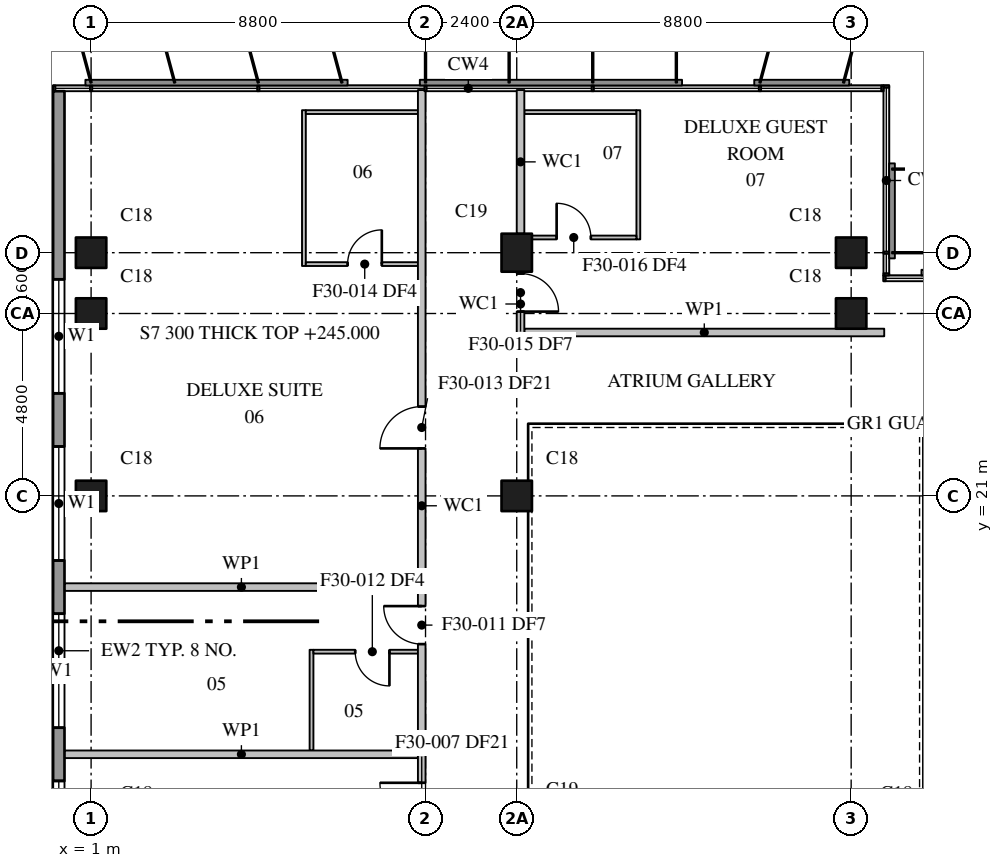
"""IFC4 building model, lengths in metres.
Left out: names, types, materials, properties, quantities, classifications, styles, units other than length and angle.
Written with IfcOpenShell. Run it as: python <this file> out.ifc"""

import sys

from ifc_helpers import new_model, si_unit, direction, frame, frame_2d, origin, origin_2d, place, context, subcontext, project, spatial, rectangle, extrude, element, fill, save


model = new_model("IFC4")
c1 = context("Model", 3, precision=1e-05, world=origin(), true_north=direction((0.0, 1.0)))
c2 = subcontext(c1, "Body", "Model", "MODEL_VIEW")
j1 = project(units=[si_unit("LENGTHUNIT", "METRE"), si_unit("PLANEANGLEUNIT", "RADIAN")], contexts=[c1])
p1 = place(None, origin())
s1 = spatial("IfcSite", under=j1, at=p1, CompositionType="ELEMENT")
p2 = place(p1, origin())
s2 = spatial("IfcBuilding", under=s1, at=p2, CompositionType="ELEMENT")
p3 = place(p2, frame((0.0, 0.0, 245.0)))
s3 = spatial("IfcBuildingStorey", under=s2, at=p3, CompositionType="ELEMENT", Elevation=245.0)
for number, where, z_axis, x_axis in (
    (1, (1.0, 21.0, 0.0), (0.0, 0.0, 1.0), (1.0, 0.0, 0.0)),
    (2, (1.0, 25.8, 0.0), (0.0, 0.0, 1.0), (1.0, 0.0, 0.0)),
    (3, (1.0, 27.4, 0.0), (0.0, 0.0, 1.0), (1.0, 0.0, 0.0)),
    (4, (12.2, 21.0, 0.0), (0.0, 0.0, 1.0), (1.0, 0.0, 0.0)),
):
    element("IfcColumn", number, at=place(p3, frame(where, z_axis=z_axis, x_axis=x_axis)), inside=s3, PredefinedType="COLUMN", context=c2, shape_type="SweptSolid", body=[
        extrude(rectangle(XDim=0.8, YDim=0.8, at=origin_2d()), origin(), (0.0, 0.0, 1.0), 3.7),
    ])
p4 = place(p3, frame((12.2, 27.4, 0.0), z_axis=(0.0, 0.0, 1.0), x_axis=(0.0, 1.0, 0.0)))
e5 = element("IfcColumn", 5, at=p4, inside=s3, PredefinedType="COLUMN", context=c2, shape_type="SweptSolid", body=[
    extrude(rectangle(XDim=1.0, YDim=0.8, at=origin_2d()), origin(), (0.0, 0.0, 1.0), 3.7),
])
for number, where, z_axis, x_axis in (
    (6, (21.0, 25.8, 0.0), (0.0, 0.0, 1.0), (1.0, 0.0, 0.0)),
    (7, (21.0, 27.4, 0.0), (0.0, 0.0, 1.0), (1.0, 0.0, 0.0)),
):
    element("IfcColumn", number, at=place(p3, frame(where, z_axis=z_axis, x_axis=x_axis)), inside=s3, PredefinedType="COLUMN", context=c2, shape_type="SweptSolid", body=[
        extrude(rectangle(XDim=0.8, YDim=0.8, at=origin_2d()), origin(), (0.0, 0.0, 1.0), 3.7),
    ])
p5 = place(p3, frame((0.15, 31.65, 0.0), z_axis=(0.0, 0.0, 1.0), x_axis=(0.0, -1.0, 0.0)))
e8 = element("IfcWall", 8, at=p5, inside=s3, PredefinedType="STANDARD", context=c2, shape_type="SweptSolid", body=[
    extrude(rectangle(XDim=29.45, YDim=0.3, at=frame_2d((14.725, 0.0))), origin(), (0.0, 0.0, 1.0), 3.4),
])
p6 = place(p5, frame((4.95, 0.0, 0.75)))
e9 = element("IfcOpeningElement", 9, at=p6, cuts=e8, PredefinedType="OPENING", context=c2, shape_type="SweptSolid", body=[
    extrude(rectangle(XDim=3.0, YDim=2.3, at=frame_2d((1.5, 1.15))), frame((0.0, 0.16, 0.0), z_axis=(0.0, -1.0, 0.0), x_axis=(1.0, 0.0, 0.0)), (0.0, 0.0, 1.0), 0.32),
])
p7 = place(p5, frame((9.35, 0.0, 0.75)))
e10 = element("IfcOpeningElement", 10, at=p7, cuts=e8, PredefinedType="OPENING", context=c2, shape_type="SweptSolid", body=[
    extrude(rectangle(XDim=3.0, YDim=2.3, at=frame_2d((1.5, 1.15))), frame((0.0, 0.16, 0.0), z_axis=(0.0, -1.0, 0.0), x_axis=(1.0, 0.0, 0.0)), (0.0, 0.0, 1.0), 0.32),
])
p8 = place(p5, frame((13.75, 0.0, 0.75)))
e11 = element("IfcOpeningElement", 11, at=p8, cuts=e8, PredefinedType="OPENING", context=c2, shape_type="SweptSolid", body=[
    extrude(rectangle(XDim=3.0, YDim=2.3, at=frame_2d((1.5, 1.15))), frame((0.0, 0.16, 0.0), z_axis=(0.0, -1.0, 0.0), x_axis=(1.0, 0.0, 0.0)), (0.0, 0.0, 1.0), 0.32),
])
p9 = place(p5, frame((18.15, 0.0, 0.75)))
e12 = element("IfcOpeningElement", 12, at=p9, cuts=e8, PredefinedType="OPENING", context=c2, shape_type="SweptSolid", body=[
    extrude(rectangle(XDim=3.0, YDim=2.3, at=frame_2d((1.5, 1.15))), frame((0.0, 0.16, 0.0), z_axis=(0.0, -1.0, 0.0), x_axis=(1.0, 0.0, 0.0)), (0.0, 0.0, 1.0), 0.32),
])
p10 = place(p5, frame((22.55, 0.0, 0.75)))
e13 = element("IfcOpeningElement", 13, at=p10, cuts=e8, PredefinedType="OPENING", context=c2, shape_type="SweptSolid", body=[
    extrude(rectangle(XDim=3.0, YDim=2.3, at=frame_2d((1.5, 1.15))), frame((0.0, 0.16, 0.0), z_axis=(0.0, -1.0, 0.0), x_axis=(1.0, 0.0, 0.0)), (0.0, 0.0, 1.0), 0.32),
])
p11 = place(p3, frame((9.7, 9.8, 0.0), z_axis=(0.0, 0.0, 1.0), x_axis=(0.0, 1.0, 0.0)))
e14 = element("IfcWall", 14, at=p11, inside=s3, PredefinedType="PARTITIONING", context=c2, shape_type="SweptSolid", body=[
    extrude(rectangle(XDim=21.88, YDim=0.2, at=frame_2d((10.94, 0.0))), origin(), (0.0, 0.0, 1.0), 3.4),
])
p12 = place(p11, frame((2.55, 0.0, 0.0)))
e15 = element("IfcOpeningElement", 15, at=p12, cuts=e14, PredefinedType="OPENING", context=c2, shape_type="SweptSolid", body=[
    extrude(rectangle(XDim=1.1, YDim=2.1, at=frame_2d((0.55, 1.05))), frame((0.0, 0.11, 0.0), z_axis=(0.0, -1.0, 0.0), x_axis=(1.0, 0.0, 0.0)), (0.0, 0.0, 1.0), 0.22),
])
p13 = place(p11, frame((7.3, 0.0, 0.0)))
e16 = element("IfcOpeningElement", 16, at=p13, cuts=e14, PredefinedType="OPENING", context=c2, shape_type="SweptSolid", body=[
    extrude(rectangle(XDim=1.0, YDim=2.1, at=frame_2d((0.5, 1.05))), frame((0.0, 0.11, 0.0), z_axis=(0.0, -1.0, 0.0), x_axis=(1.0, 0.0, 0.0)), (0.0, 0.0, 1.0), 0.22),
])
p14 = place(p11, frame((12.45, 0.0, 0.0)))
e17 = element("IfcOpeningElement", 17, at=p14, cuts=e14, PredefinedType="OPENING", context=c2, shape_type="SweptSolid", body=[
    extrude(rectangle(XDim=1.1, YDim=2.1, at=frame_2d((0.55, 1.05))), frame((0.0, 0.11, 0.0), z_axis=(0.0, -1.0, 0.0), x_axis=(1.0, 0.0, 0.0)), (0.0, 0.0, 1.0), 0.22),
])
for number, where, z_axis, x_axis in (
    (18, (0.31, 14.2, 0.0), (0.0, 0.0, 1.0), (1.0, 0.0, 0.0)),
    (19, (0.31, 18.6, 0.0), (0.0, 0.0, 1.0), (1.0, 0.0, 0.0)),
):
    element("IfcWall", number, at=place(p3, frame(where, z_axis=z_axis, x_axis=x_axis)), inside=s3, PredefinedType="PARTITIONING", context=c2, shape_type="SweptSolid", body=[
        extrude(rectangle(XDim=9.29, YDim=0.2, at=frame_2d((4.645, 0.0))), origin(), (0.0, 0.0, 1.0), 3.4),
    ])
p15 = place(p3, frame((12.3, 26.9, 0.0), z_axis=(0.0, 0.0, 1.0), x_axis=(0.0, -1.0, 0.0)))
e20 = element("IfcWall", 20, at=p15, inside=s3, PredefinedType="PARTITIONING", context=c2, shape_type="SweptSolid", body=[
    extrude(rectangle(XDim=1.7, YDim=0.2, at=frame_2d((0.85, 0.0))), origin(), (0.0, 0.0, 1.0), 3.4),
])
p16 = place(p15, frame((0.05, 0.0, 0.0)))
e21 = element("IfcOpeningElement", 21, at=p16, cuts=e20, PredefinedType="OPENING", context=c2, shape_type="SweptSolid", body=[
    extrude(rectangle(XDim=1.0, YDim=2.1, at=frame_2d((0.5, 1.05))), frame((0.0, 0.11, 0.0), z_axis=(0.0, -1.0, 0.0), x_axis=(1.0, 0.0, 0.0)), (0.0, 0.0, 1.0), 0.22),
])
p17 = place(p3, frame((12.3, 27.9, 0.0), z_axis=(0.0, 0.0, 1.0), x_axis=(0.0, 1.0, 0.0)))
e22 = element("IfcWall", 22, at=p17, inside=s3, PredefinedType="PARTITIONING", context=c2, shape_type="SweptSolid", body=[
    extrude(rectangle(XDim=3.78, YDim=0.2, at=frame_2d((1.89, 0.0))), origin(), (0.0, 0.0, 1.0), 3.4),
])
p18 = place(p3, frame((12.4, 25.3, 0.0), z_axis=(0.0, 0.0, 1.0), x_axis=(1.0, 0.0, 0.0)))
e23 = element("IfcWall", 23, at=p18, inside=s3, PredefinedType="PARTITIONING", context=c2, shape_type="SweptSolid", body=[
    extrude(rectangle(XDim=9.47, YDim=0.2, at=frame_2d((4.735, 0.0))), origin(), (0.0, 0.0, 1.0), 3.4),
])
p19 = place(p3, frame((6.8, 14.3, 0.0), z_axis=(0.0, 0.0, 1.0), x_axis=(0.0, 1.0, 0.0)))
e24 = element("IfcWall", 24, at=p19, inside=s3, PredefinedType="PARTITIONING", context=c2, shape_type="SweptSolid", body=[
    extrude(rectangle(XDim=2.65, YDim=0.1, at=frame_2d((1.325, 0.0))), origin(), (0.0, 0.0, 1.0), 3.4),
])
p20 = place(p3, frame((9.6, 16.9, 0.0), z_axis=(0.0, 0.0, 1.0), x_axis=(-1.0, 0.0, 0.0)))
e25 = element("IfcWall", 25, at=p20, inside=s3, PredefinedType="PARTITIONING", context=c2, shape_type="SweptSolid", body=[
    extrude(rectangle(XDim=2.75, YDim=0.1, at=frame_2d((1.375, 0.0))), origin(), (0.0, 0.0, 1.0), 3.4),
])
p21 = place(p20, frame((0.75, 0.0, 0.0)))
e26 = element("IfcOpeningElement", 26, at=p21, cuts=e25, PredefinedType="OPENING", context=c2, shape_type="SweptSolid", body=[
    extrude(rectangle(XDim=0.9, YDim=2.1, at=frame_2d((0.45, 1.05))), frame((0.0, 0.06, 0.0), z_axis=(0.0, -1.0, 0.0), x_axis=(1.0, 0.0, 0.0)), (0.0, 0.0, 1.0), 0.12),
])
p22 = place(p3, frame((6.6, 27.05, 0.0), z_axis=(0.0, 0.0, 1.0), x_axis=(0.0, 1.0, 0.0)))
e27 = element("IfcWall", 27, at=p22, inside=s3, PredefinedType="PARTITIONING", context=c2, shape_type="SweptSolid", body=[
    extrude(rectangle(XDim=4.1, YDim=0.1, at=frame_2d((2.05, 0.0))), origin(), (0.0, 0.0, 1.0), 3.4),
])
p23 = place(p3, frame((6.65, 27.1, 0.0), z_axis=(0.0, 0.0, 1.0), x_axis=(1.0, 0.0, 0.0)))
e28 = element("IfcWall", 28, at=p23, inside=s3, PredefinedType="PARTITIONING", context=c2, shape_type="SweptSolid", body=[
    extrude(rectangle(XDim=2.95, YDim=0.1, at=frame_2d((1.475, 0.0))), origin(), (0.0, 0.0, 1.0), 3.4),
])
p24 = place(p23, frame((1.1, 0.0, 0.0)))
e29 = element("IfcOpeningElement", 29, at=p24, cuts=e28, PredefinedType="OPENING", context=c2, shape_type="SweptSolid", body=[
    extrude(rectangle(XDim=0.9, YDim=2.1, at=frame_2d((0.45, 1.05))), frame((0.0, 0.06, 0.0), z_axis=(0.0, -1.0, 0.0), x_axis=(1.0, 0.0, 0.0)), (0.0, 0.0, 1.0), 0.12),
])
for number, where, z_axis, x_axis in (
    (30, (6.65, 31.1, 0.0), (0.0, 0.0, 1.0), (1.0, 0.0, 0.0)),
    (31, (12.4, 31.1, 0.0), (0.0, 0.0, 1.0), (1.0, 0.0, 0.0)),
):
    element("IfcWall", number, at=place(p3, frame(where, z_axis=z_axis, x_axis=x_axis)), inside=s3, PredefinedType="PARTITIONING", context=c2, shape_type="SweptSolid", body=[
        extrude(rectangle(XDim=2.95, YDim=0.1, at=frame_2d((1.475, 0.0))), origin(), (0.0, 0.0, 1.0), 3.4),
    ])
p25 = place(p3, frame((15.4, 27.75, 0.0), z_axis=(0.0, 0.0, 1.0), x_axis=(0.0, 1.0, 0.0)))
e32 = element("IfcWall", 32, at=p25, inside=s3, PredefinedType="PARTITIONING", context=c2, shape_type="SweptSolid", body=[
    extrude(rectangle(XDim=3.4, YDim=0.1, at=frame_2d((1.7, 0.0))), origin(), (0.0, 0.0, 1.0), 3.4),
])
p26 = place(p3, frame((12.6, 27.8, 0.0), z_axis=(0.0, 0.0, 1.0), x_axis=(1.0, 0.0, 0.0)))
e33 = element("IfcWall", 33, at=p26, inside=s3, PredefinedType="PARTITIONING", context=c2, shape_type="SweptSolid", body=[
    extrude(rectangle(XDim=2.75, YDim=0.1, at=frame_2d((1.375, 0.0))), origin(), (0.0, 0.0, 1.0), 3.4),
])
p27 = place(p26, frame((0.65, 0.0, 0.0)))
e34 = element("IfcOpeningElement", 34, at=p27, cuts=e33, PredefinedType="OPENING", context=c2, shape_type="SweptSolid", body=[
    extrude(rectangle(XDim=0.9, YDim=2.1, at=frame_2d((0.45, 1.05))), frame((0.0, 0.06, 0.0), z_axis=(0.0, -1.0, 0.0), x_axis=(1.0, 0.0, 0.0)), (0.0, 0.0, 1.0), 0.12),
])
p28 = place(p6, origin())
e35 = element("IfcWindow", 35, at=p28, inside=s3, PartitioningType="SINGLE_PANEL", PredefinedType="WINDOW", context=c2, shape_type="SweptSolid", body=[
    extrude(rectangle(XDim=3.0, YDim=2.3, at=frame_2d((1.5, 1.15))), frame((0.0, 0.03, 0.0), z_axis=(0.0, -1.0, 0.0), x_axis=(1.0, 0.0, 0.0)), (0.0, 0.0, 1.0), 0.06),
])
fill(e9, e35)
p29 = place(p7, origin())
e36 = element("IfcWindow", 36, at=p29, inside=s3, PartitioningType="SINGLE_PANEL", PredefinedType="WINDOW", context=c2, shape_type="SweptSolid", body=[
    extrude(rectangle(XDim=3.0, YDim=2.3, at=frame_2d((1.5, 1.15))), frame((0.0, 0.03, 0.0), z_axis=(0.0, -1.0, 0.0), x_axis=(1.0, 0.0, 0.0)), (0.0, 0.0, 1.0), 0.06),
])
fill(e10, e36)
p30 = place(p8, origin())
e37 = element("IfcWindow", 37, at=p30, inside=s3, PartitioningType="SINGLE_PANEL", PredefinedType="WINDOW", context=c2, shape_type="SweptSolid", body=[
    extrude(rectangle(XDim=3.0, YDim=2.3, at=frame_2d((1.5, 1.15))), frame((0.0, 0.03, 0.0), z_axis=(0.0, -1.0, 0.0), x_axis=(1.0, 0.0, 0.0)), (0.0, 0.0, 1.0), 0.06),
])
fill(e11, e37)
p31 = place(p9, origin())
e38 = element("IfcWindow", 38, at=p31, inside=s3, PartitioningType="SINGLE_PANEL", PredefinedType="WINDOW", context=c2, shape_type="SweptSolid", body=[
    extrude(rectangle(XDim=3.0, YDim=2.3, at=frame_2d((1.5, 1.15))), frame((0.0, 0.03, 0.0), z_axis=(0.0, -1.0, 0.0), x_axis=(1.0, 0.0, 0.0)), (0.0, 0.0, 1.0), 0.06),
])
fill(e12, e38)
p32 = place(p12, origin())
e39 = element("IfcDoor", 39, at=p32, inside=s3, OperationType="SINGLE_SWING_RIGHT", PredefinedType="DOOR", context=c2, shape_type="SweptSolid", body=[
    extrude(rectangle(XDim=1.1, YDim=2.1, at=frame_2d((0.55, 1.05))), frame((0.0, 0.025, 0.0), z_axis=(0.0, -1.0, 0.0), x_axis=(1.0, 0.0, 0.0)), (0.0, 0.0, 1.0), 0.05),
])
fill(e15, e39)
p33 = place(p13, origin())
e40 = element("IfcDoor", 40, at=p33, inside=s3, OperationType="SINGLE_SWING_RIGHT", PredefinedType="DOOR", context=c2, shape_type="SweptSolid", body=[
    extrude(rectangle(XDim=1.0, YDim=2.1, at=frame_2d((0.5, 1.05))), frame((0.0, 0.025, 0.0), z_axis=(0.0, -1.0, 0.0), x_axis=(1.0, 0.0, 0.0)), (0.0, 0.0, 1.0), 0.05),
])
fill(e16, e40)
p34 = place(p21, origin())
e41 = element("IfcDoor", 41, at=p34, inside=s3, OperationType="SINGLE_SWING_LEFT", PredefinedType="DOOR", context=c2, shape_type="SweptSolid", body=[
    extrude(rectangle(XDim=0.9, YDim=2.1, at=frame_2d((0.45, 1.05))), frame((0.0, 0.025, 0.0), z_axis=(0.0, -1.0, 0.0), x_axis=(1.0, 0.0, 0.0)), (0.0, 0.0, 1.0), 0.05),
])
fill(e26, e41)
p35 = place(p14, origin())
e42 = element("IfcDoor", 42, at=p35, inside=s3, OperationType="SINGLE_SWING_LEFT", PredefinedType="DOOR", context=c2, shape_type="SweptSolid", body=[
    extrude(rectangle(XDim=1.1, YDim=2.1, at=frame_2d((0.55, 1.05))), frame((0.0, 0.025, 0.0), z_axis=(0.0, -1.0, 0.0), x_axis=(1.0, 0.0, 0.0)), (0.0, 0.0, 1.0), 0.05),
])
fill(e17, e42)
p36 = place(p24, origin())
e43 = element("IfcDoor", 43, at=p36, inside=s3, OperationType="SINGLE_SWING_RIGHT", PredefinedType="DOOR", context=c2, shape_type="SweptSolid", body=[
    extrude(rectangle(XDim=0.9, YDim=2.1, at=frame_2d((0.45, 1.05))), frame((0.0, 0.025, 0.0), z_axis=(0.0, -1.0, 0.0), x_axis=(1.0, 0.0, 0.0)), (0.0, 0.0, 1.0), 0.05),
])
fill(e29, e43)
p37 = place(p16, origin())
e44 = element("IfcDoor", 44, at=p37, inside=s3, OperationType="SINGLE_SWING_RIGHT", PredefinedType="DOOR", context=c2, shape_type="SweptSolid", body=[
    extrude(rectangle(XDim=1.0, YDim=2.1, at=frame_2d((0.5, 1.05))), frame((0.0, 0.025, 0.0), z_axis=(0.0, -1.0, 0.0), x_axis=(1.0, 0.0, 0.0)), (0.0, 0.0, 1.0), 0.05),
])
fill(e21, e44)
p38 = place(p27, origin())
e45 = element("IfcDoor", 45, at=p38, inside=s3, OperationType="SINGLE_SWING_LEFT", PredefinedType="DOOR", context=c2, shape_type="SweptSolid", body=[
    extrude(rectangle(XDim=0.9, YDim=2.1, at=frame_2d((0.45, 1.05))), frame((0.0, 0.025, 0.0), z_axis=(0.0, -1.0, 0.0), x_axis=(1.0, 0.0, 0.0)), (0.0, 0.0, 1.0), 0.05),
])
fill(e34, e45)
save(model, sys.argv[1])
